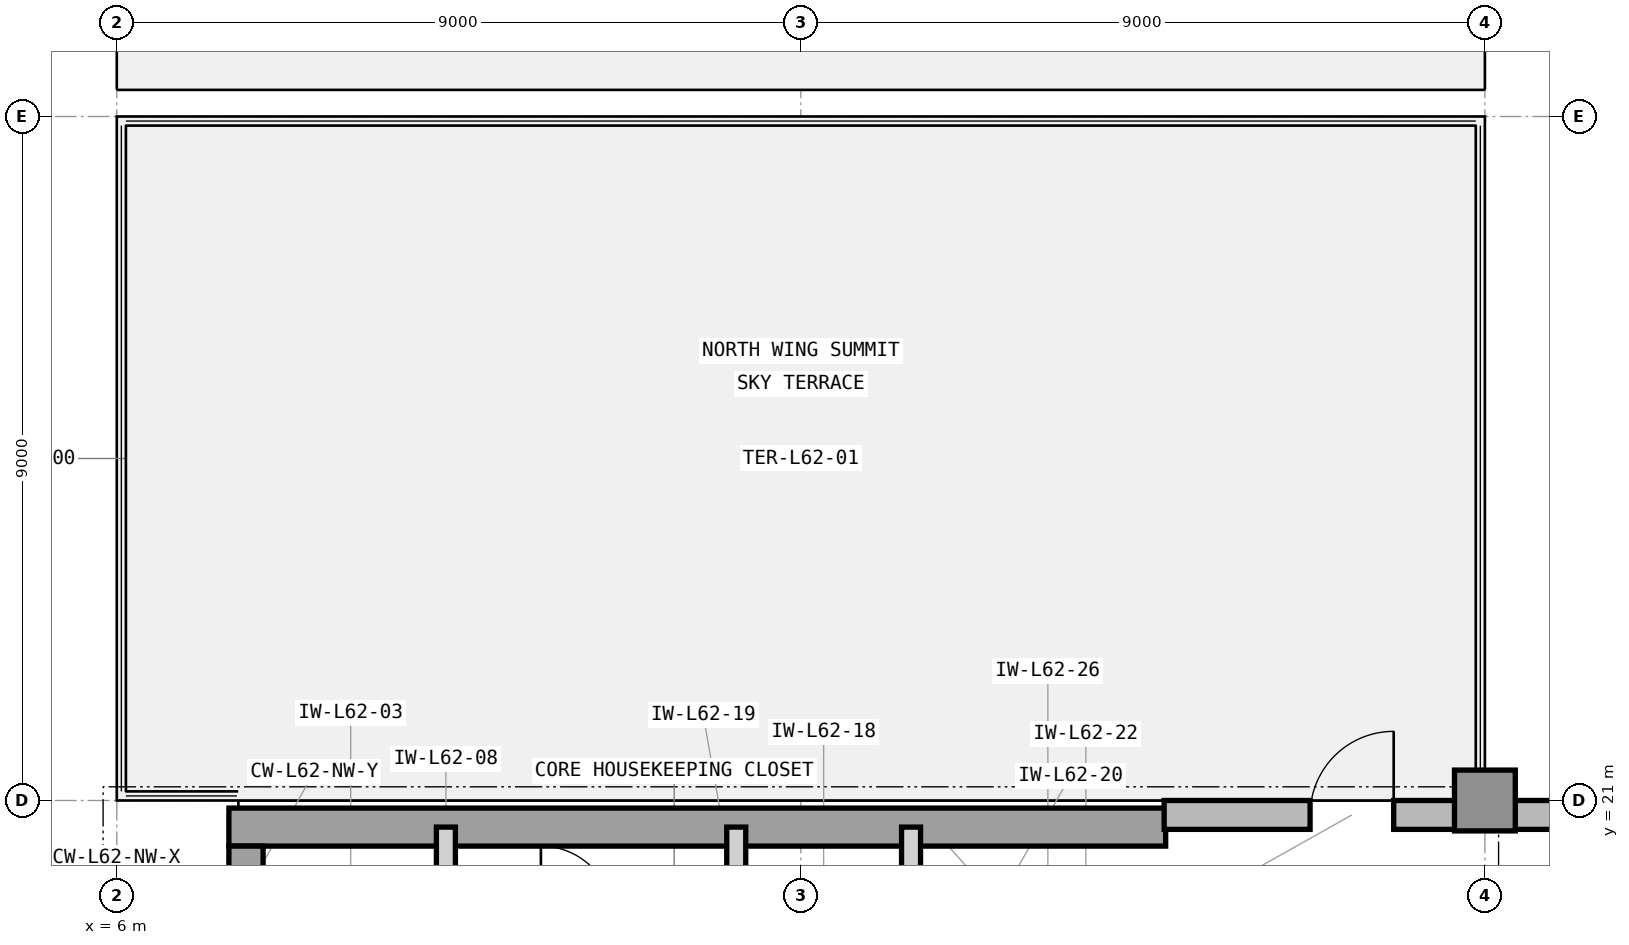
"""IFC4 building model, lengths in metres.
Left out: names, types, materials, properties, quantities, classifications, styles, units other than length and angle.
Written with IfcOpenShell. Run it as: python <this file> out.ifc"""

import sys

from ifc_helpers import new_model, si_unit, direction, frame, frame_2d, origin, origin_2d, place, context, subcontext, project, spatial, rectangle, extrude, element, fill, save


model = new_model("IFC4")
c1 = context("Model", 3, precision=1e-05, world=origin(), true_north=direction((0.0, 1.0)))
c2 = subcontext(c1, "Body", "Model", "MODEL_VIEW")
j1 = project(units=[si_unit("LENGTHUNIT", "METRE"), si_unit("PLANEANGLEUNIT", "RADIAN")], contexts=[c1])
p1 = place(None, origin())
s1 = spatial("IfcSite", under=j1, at=p1, CompositionType="ELEMENT")
p2 = place(p1, origin())
s2 = spatial("IfcBuilding", under=s1, at=p2, CompositionType="ELEMENT")
p3 = place(p2, frame((0.0, 0.0, 254.7)))
s3 = spatial("IfcBuildingStorey", under=s2, at=p3, CompositionType="ELEMENT", Elevation=254.7)
p4 = place(p3, frame((7.475, 20.65, 0.0), z_axis=(0.0, 0.0, 1.0), x_axis=(1.0, 0.0, 0.0)))
e1 = element("IfcWall", 1, at=p4, inside=s3, PredefinedType="SHEAR", context=c2, shape_type="SweptSolid", body=[
    extrude(rectangle(XDim=12.325, YDim=0.5, at=frame_2d((6.163, 0.0))), origin(), (0.0, 0.0, 1.0), 3.9),
])
p5 = place(p3, frame((7.7, 19.575, 0.0), z_axis=(0.0, 0.0, 1.0), x_axis=(0.0, 1.0, 0.0)))
e2 = element("IfcWall", 2, at=p5, inside=s3, PredefinedType="SHEAR", context=c2, shape_type="SweptSolid", body=[
    extrude(rectangle(XDim=0.825, YDim=0.45, at=frame_2d((0.413, 0.0))), origin(), (0.0, 0.0, 1.0), 3.9),
])
p6 = place(p3, frame((24.0, 21.0, 0.0), z_axis=(0.0, 0.0, 1.0), x_axis=(1.0, 0.0, 0.0)))
e3 = element("IfcColumn", 3, at=p6, inside=s3, PredefinedType="COLUMN", context=c2, shape_type="SweptSolid", body=[
    extrude(rectangle(XDim=0.8, YDim=0.8, at=origin_2d()), origin(), (0.0, 0.0, 1.0), 3.9),
])
p7 = place(p3, frame((52.4, 20.81, 0.0), z_axis=(0.0, 0.0, 1.0), x_axis=(-1.0, 0.0, 0.0)))
e4 = element("IfcWall", 4, at=p7, inside=s3, PredefinedType="STANDARD", context=c2, shape_type="SweptSolid", body=[
    extrude(rectangle(XDim=32.62, YDim=0.38, at=frame_2d((16.31, 0.0))), origin(), (0.0, 0.0, 1.0), 3.715),
])
p8 = place(p7, frame((29.6, 0.0, 0.0)))
e5 = element("IfcOpeningElement", 5, at=p8, cuts=e4, PredefinedType="OPENING", context=c2, shape_type="SweptSolid", body=[
    extrude(rectangle(XDim=1.1, YDim=2.3, at=frame_2d((0.55, 1.15))), frame((0.0, 0.2, 0.0), z_axis=(0.0, -1.0, 0.0), x_axis=(1.0, 0.0, 0.0)), (0.0, 0.0, 1.0), 0.4),
])
p9 = place(p7, frame((20.354, 0.0, 0.8)))
e6 = element("IfcOpeningElement", 6, at=p9, cuts=e4, PredefinedType="OPENING", context=c2, shape_type="SweptSolid", body=[
    extrude(rectangle(XDim=2.6, YDim=2.35, at=frame_2d((1.3, 1.175))), frame((0.0, 0.2, 0.0), z_axis=(0.0, -1.0, 0.0), x_axis=(1.0, 0.0, 0.0)), (0.0, 0.0, 1.0), 0.4),
])
p10 = place(p7, frame((12.154, 0.0, 0.8)))
e7 = element("IfcOpeningElement", 7, at=p10, cuts=e4, PredefinedType="OPENING", context=c2, shape_type="SweptSolid", body=[
    extrude(rectangle(XDim=2.6, YDim=2.35, at=frame_2d((1.3, 1.175))), frame((0.0, 0.2, 0.0), z_axis=(0.0, -1.0, 0.0), x_axis=(1.0, 0.0, 0.0)), (0.0, 0.0, 1.0), 0.4),
])
p11 = place(p7, frame((6.504, 0.0, 0.8)))
e8 = element("IfcOpeningElement", 8, at=p11, cuts=e4, PredefinedType="OPENING", context=c2, shape_type="SweptSolid", body=[
    extrude(rectangle(XDim=2.6, YDim=2.35, at=frame_2d((1.3, 1.175))), frame((0.0, 0.2, 0.0), z_axis=(0.0, -1.0, 0.0), x_axis=(1.0, 0.0, 0.0)), (0.0, 0.0, 1.0), 0.4),
])
p12 = place(p3, frame((10.33, 19.45, 0.0), z_axis=(0.0, 0.0, 1.0), x_axis=(0.0, 1.0, 0.0)))
e9 = element("IfcWall", 9, at=p12, inside=s3, PredefinedType="PARTITIONING", context=c2, shape_type="SweptSolid", body=[
    extrude(rectangle(XDim=1.2, YDim=0.25, at=frame_2d((0.6, 0.0))), origin(), (0.0, 0.0, 1.0), 3.705),
])
for number, where, z_axis, x_axis in (
    (10, (14.15, 16.7, 0.0), (0.0, 0.0, 1.0), (0.0, 1.0, 0.0)),
    (11, (16.45, 16.7, 0.0), (0.0, 0.0, 1.0), (0.0, 1.0, 0.0)),
):
    element("IfcWall", number, at=place(p3, frame(where, z_axis=z_axis, x_axis=x_axis)), inside=s3, PredefinedType="PARTITIONING", context=c2, shape_type="SweptSolid", body=[
        extrude(rectangle(XDim=3.95, YDim=0.25, at=frame_2d((1.975, 0.0))), origin(), (0.0, 0.0, 1.0), 3.705),
    ])
p13 = place(p8, frame((1.1, 0.0, 0.0), z_axis=(0.0, 0.0, 1.0), x_axis=(-1.0, 0.0, 0.0)))
e12 = element("IfcDoor", 12, at=p13, inside=s3, OperationType="SINGLE_SWING_RIGHT", PredefinedType="DOOR", context=c2, shape_type="SweptSolid", body=[
    extrude(rectangle(XDim=1.1, YDim=2.3, at=frame_2d((0.55, 1.15))), frame((0.0, 0.025, 0.0), z_axis=(0.0, -1.0, 0.0), x_axis=(1.0, 0.0, 0.0)), (0.0, 0.0, 1.0), 0.05),
])
fill(e5, e12)
save(model, sys.argv[1])
